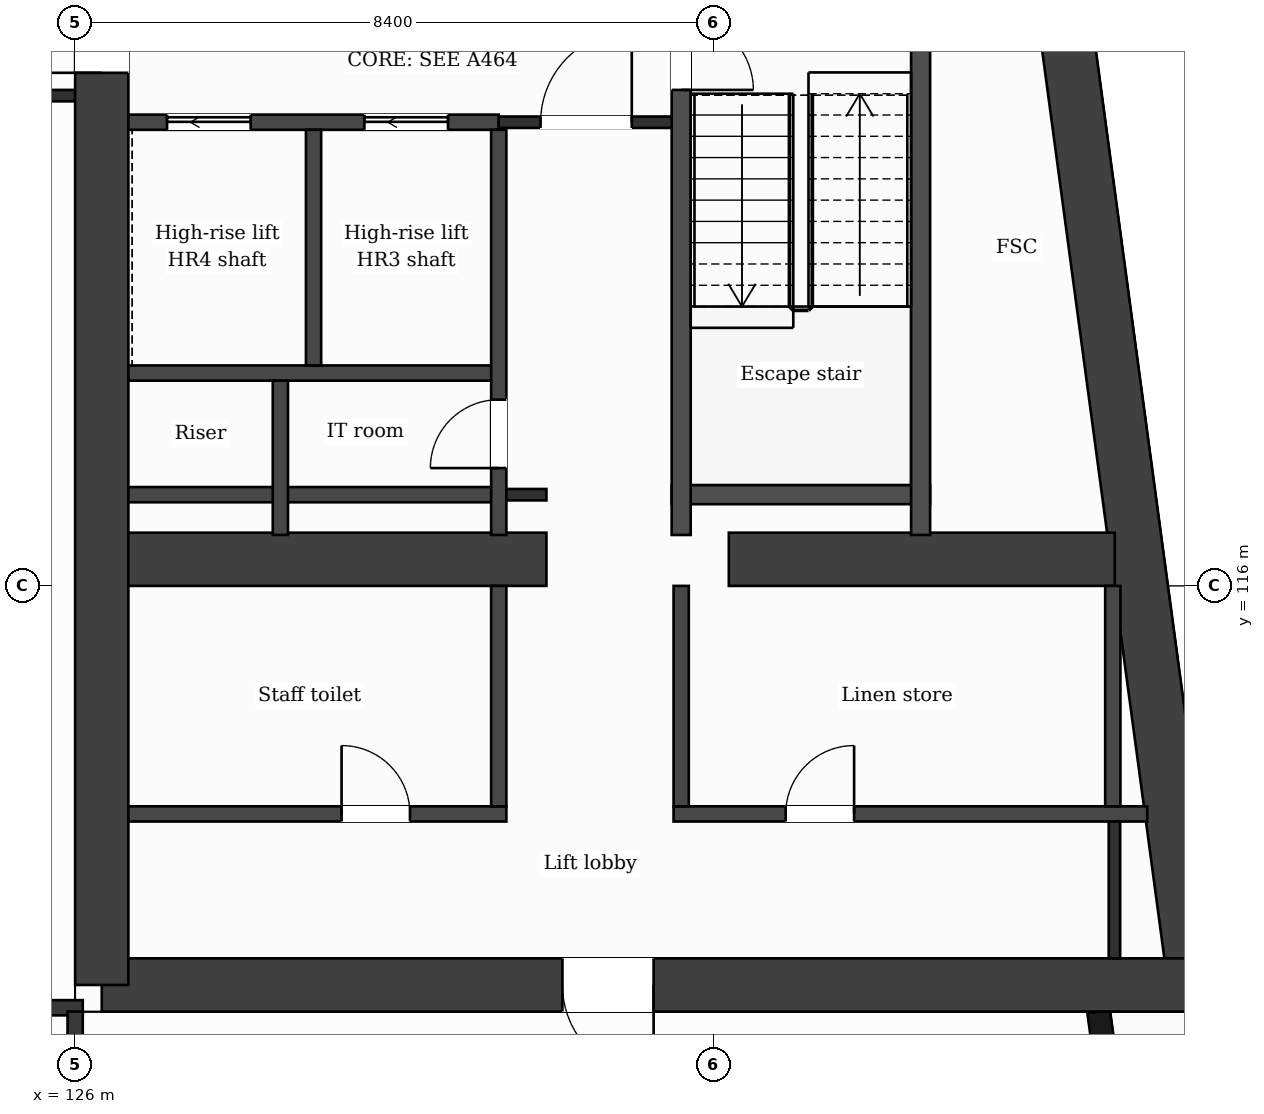
"""IFC4 building model, lengths in metres.
Left out: names, types, materials, properties, quantities, classifications, styles, units other than length and angle.
Written with IfcOpenShell. Run it as: python <this file> out.ifc"""

import sys

from ifc_helpers import new_model, si_unit, direction, frame, frame_2d, origin, place, context, subcontext, project, spatial, rectangle, extrude, element, fill, save


model = new_model("IFC4")
c1 = context("Model", 3, precision=1e-05, world=origin(), true_north=direction((0.0, 1.0)))
c2 = subcontext(c1, "Body", "Model", "MODEL_VIEW")
j1 = project(units=[si_unit("LENGTHUNIT", "METRE"), si_unit("PLANEANGLEUNIT", "RADIAN")], contexts=[c1])
p1 = place(None, origin())
s1 = spatial("IfcSite", under=j1, at=p1, CompositionType="ELEMENT")
p2 = place(p1, origin())
s2 = spatial("IfcBuilding", under=s1, at=p2, CompositionType="ELEMENT")
p3 = place(p2, frame((0.0, 0.0, 262.7)))
s3 = spatial("IfcBuildingStorey", under=s2, at=p3, CompositionType="ELEMENT", Elevation=262.7)
p4 = place(p3, frame((137.863, 132.05, 0.0), z_axis=(0.0, 0.0, 1.0), x_axis=(0.133406218907, -0.991061441464, 0.0)))
e1 = element("IfcWall", 1, at=p4, inside=s3, PredefinedType="SHEAR", context=c2, shape_type="SweptSolid", body=[
    extrude(rectangle(XDim=21.492, YDim=0.7, at=frame_2d((10.746, 0.0))), origin(), (0.0, 0.0, 1.0), 3.7),
])
p5 = place(p3, frame((140.73, 110.75, 0.0), z_axis=(0.0, 0.0, 1.0), x_axis=(-1.0, 0.0, 0.0)))
e2 = element("IfcWall", 2, at=p5, inside=s3, PredefinedType="SHEAR", context=c2, shape_type="SweptSolid", body=[
    extrude(rectangle(XDim=14.38, YDim=0.7, at=frame_2d((7.19, 0.0))), origin(), (0.0, 0.0, 1.0), 3.7),
])
p6 = place(p5, frame((7.12, 0.0, 0.0)))
e3 = element("IfcOpeningElement", 3, at=p6, cuts=e2, PredefinedType="OPENING", context=c2, shape_type="SweptSolid", body=[
    extrude(rectangle(XDim=1.2, YDim=2.1, at=frame_2d((0.6, 1.05))), frame((0.0, 0.36, 0.0), z_axis=(0.0, -1.0, 0.0), x_axis=(1.0, 0.0, 0.0)), (0.0, 0.0, 1.0), 0.72),
])
p7 = place(p3, frame((126.35, 110.75, 0.0), z_axis=(0.0, 0.0, 1.0), x_axis=(0.0, 1.0, 0.0)))
e4 = element("IfcWall", 4, at=p7, inside=s3, PredefinedType="SHEAR", context=c2, shape_type="SweptSolid", body=[
    extrude(rectangle(XDim=21.3, YDim=0.7, at=frame_2d((10.65, 0.0))), origin(), (0.0, 0.0, 1.0), 3.7),
])
p8 = place(p7, frame((12.0, 0.0, 0.0)))
e5 = element("IfcOpeningElement", 5, at=p8, cuts=e4, PredefinedType="OPENING", context=c2, shape_type="SweptSolid", body=[
    extrude(rectangle(XDim=1.4, YDim=2.1, at=frame_2d((0.7, 1.05))), frame((0.0, 0.36, 0.0), z_axis=(0.0, -1.0, 0.0), x_axis=(1.0, 0.0, 0.0)), (0.0, 0.0, 1.0), 0.72),
])
p9 = place(p3, frame((126.7, 116.35, 0.0), z_axis=(0.0, 0.0, 1.0), x_axis=(1.0, 0.0, 0.0)))
e6 = element("IfcWall", 6, at=p9, inside=s3, PredefinedType="SHEAR", context=c2, shape_type="SweptSolid", body=[
    extrude(rectangle(XDim=5.5, YDim=0.7, at=frame_2d((2.75, 0.0))), origin(), (0.0, 0.0, 1.0), 3.7),
])
p10 = place(p3, frame((134.6, 116.35, 0.0), z_axis=(0.0, 0.0, 1.0), x_axis=(1.0, 0.0, 0.0)))
e7 = element("IfcWall", 7, at=p10, inside=s3, PredefinedType="SHEAR", context=c2, shape_type="SweptSolid", body=[
    extrude(rectangle(XDim=5.077, YDim=0.7, at=frame_2d((2.539, 0.0))), origin(), (0.0, 0.0, 1.0), 3.7),
])
p11 = place(p3, frame((139.701, 108.65, 0.0), z_axis=(0.0, 0.0, 1.0), x_axis=(-0.133422458344, 0.991059255347, 0.0)))
e8 = element("IfcWall", 8, at=p11, inside=s3, PredefinedType="SOLIDWALL", context=c2, shape_type="SweptSolid", body=[
    extrude(rectangle(XDim=1.766, YDim=0.3, at=frame_2d((0.883, 0.0))), origin(), (0.0, 0.0, 1.0), 3.38),
])
p12 = place(p3, frame((100.7, 110.45, 0.0), z_axis=(0.0, 0.0, 1.0), x_axis=(1.0, 0.0, 0.0)))
e9 = element("IfcWall", 9, at=p12, inside=s3, PredefinedType="PARTITIONING", context=c2, shape_type="SweptSolid", body=[
    extrude(rectangle(XDim=25.4, YDim=0.2, at=frame_2d((12.7, 0.0))), origin(), (0.0, 0.0, 1.0), 3.38),
])
p13 = place(p3, frame((126.7, 113.0, 0.0), z_axis=(0.0, 0.0, 1.0), x_axis=(1.0, 0.0, 0.0)))
e10 = element("IfcWall", 10, at=p13, inside=s3, PredefinedType="PARTITIONING", context=c2, shape_type="SweptSolid", body=[
    extrude(rectangle(XDim=4.973, YDim=0.2, at=frame_2d((2.487, 0.0))), origin(), (0.0, 0.0, 1.0), 3.38),
])
p14 = place(p13, frame((2.805, 0.0, 0.0)))
e11 = element("IfcOpeningElement", 11, at=p14, cuts=e10, PredefinedType="OPENING", context=c2, shape_type="SweptSolid", body=[
    extrude(rectangle(XDim=0.9, YDim=2.1, at=frame_2d((0.45, 1.05))), frame((0.0, 0.11, 0.0), z_axis=(0.0, -1.0, 0.0), x_axis=(1.0, 0.0, 0.0)), (0.0, 0.0, 1.0), 0.22),
])
p15 = place(p3, frame((133.873, 113.0, 0.0), z_axis=(0.0, 0.0, 1.0), x_axis=(1.0, 0.0, 0.0)))
e12 = element("IfcWall", 12, at=p15, inside=s3, PredefinedType="PARTITIONING", context=c2, shape_type="SweptSolid", body=[
    extrude(rectangle(XDim=6.231, YDim=0.2, at=frame_2d((3.116, 0.0))), origin(), (0.0, 0.0, 1.0), 3.38),
])
p16 = place(p15, frame((1.475, 0.0, 0.0)))
e13 = element("IfcOpeningElement", 13, at=p16, cuts=e12, PredefinedType="OPENING", context=c2, shape_type="SweptSolid", body=[
    extrude(rectangle(XDim=0.9, YDim=2.1, at=frame_2d((0.45, 1.05))), frame((0.0, 0.11, 0.0), z_axis=(0.0, -1.0, 0.0), x_axis=(1.0, 0.0, 0.0)), (0.0, 0.0, 1.0), 0.22),
])
p17 = place(p3, frame((126.7, 117.2, 0.0), z_axis=(0.0, 0.0, 1.0), x_axis=(1.0, 0.0, 0.0)))
e14 = element("IfcWall", 14, at=p17, inside=s3, PredefinedType="PARTITIONING", context=c2, shape_type="SweptSolid", body=[
    extrude(rectangle(XDim=4.873, YDim=0.2, at=frame_2d((2.437, 0.0))), origin(), (0.0, 0.0, 1.0), 3.38),
])
p18 = place(p3, frame((131.573, 117.2, 0.0), z_axis=(0.0, 0.0, 1.0), x_axis=(1.0, 0.0, 0.0)))
e15 = element("IfcWall", 15, at=p18, inside=s3, PredefinedType="PARTITIONING", context=c2, shape_type="SweptSolid", body=[
    extrude(rectangle(XDim=0.627, YDim=0.15, at=frame_2d((0.313, 0.0))), origin(), (0.0, 0.0, 1.0), 3.38),
])
p19 = place(p3, frame((133.848, 117.2, 0.0), z_axis=(0.0, 0.0, 1.0), x_axis=(1.0, 0.0, 0.0)))
e16 = element("IfcWall", 16, at=p19, inside=s3, PredefinedType="PARTITIONING", context=c2, shape_type="SweptSolid", body=[
    extrude(rectangle(XDim=3.4, YDim=0.25, at=frame_2d((1.7, 0.0))), origin(), (0.0, 0.0, 1.0), 3.38),
])
p20 = place(p3, frame((126.7, 118.8, 0.0), z_axis=(0.0, 0.0, 1.0), x_axis=(1.0, 0.0, 0.0)))
e17 = element("IfcWall", 17, at=p20, inside=s3, PredefinedType="PARTITIONING", context=c2, shape_type="SweptSolid", body=[
    extrude(rectangle(XDim=4.873, YDim=0.2, at=frame_2d((2.437, 0.0))), origin(), (0.0, 0.0, 1.0), 3.38),
])
p21 = place(p3, frame((126.7, 122.1, 0.0), z_axis=(0.0, 0.0, 1.0), x_axis=(1.0, 0.0, 0.0)))
e18 = element("IfcWall", 18, at=p21, inside=s3, PredefinedType="PARTITIONING", context=c2, shape_type="SweptSolid", body=[
    extrude(rectangle(XDim=4.873, YDim=0.2, at=frame_2d((2.437, 0.0))), origin(), (0.0, 0.0, 1.0), 3.38),
])
p22 = place(p21, frame((3.105, 0.0, 0.0)))
e19 = element("IfcOpeningElement", 19, at=p22, cuts=e18, PredefinedType="OPENING", context=c2, shape_type="SweptSolid", body=[
    extrude(rectangle(XDim=1.1, YDim=2.1, at=frame_2d((0.55, 1.05))), frame((0.0, 0.11, 0.0), z_axis=(0.0, -1.0, 0.0), x_axis=(1.0, 0.0, 0.0)), (0.0, 0.0, 1.0), 0.22),
])
p23 = place(p21, frame((0.509, 0.0, 0.0)))
e20 = element("IfcOpeningElement", 20, at=p23, cuts=e18, PredefinedType="OPENING", context=c2, shape_type="SweptSolid", body=[
    extrude(rectangle(XDim=1.1, YDim=2.1, at=frame_2d((0.55, 1.05))), frame((0.0, 0.11, 0.0), z_axis=(0.0, -1.0, 0.0), x_axis=(1.0, 0.0, 0.0)), (0.0, 0.0, 1.0), 0.22),
])
p24 = place(p3, frame((131.573, 122.1, 0.0), z_axis=(0.0, 0.0, 1.0), x_axis=(1.0, 0.0, 0.0)))
e21 = element("IfcWall", 21, at=p24, inside=s3, PredefinedType="PARTITIONING", context=c2, shape_type="SweptSolid", body=[
    extrude(rectangle(XDim=2.4, YDim=0.15, at=frame_2d((1.2, 0.0))), origin(), (0.0, 0.0, 1.0), 3.38),
])
p25 = place(p24, frame((0.55, 0.0, 0.0)))
e22 = element("IfcOpeningElement", 22, at=p25, cuts=e21, PredefinedType="OPENING", context=c2, shape_type="SweptSolid", body=[
    extrude(rectangle(XDim=1.2, YDim=2.1, at=frame_2d((0.6, 1.05))), frame((0.0, 0.085, 0.0), z_axis=(0.0, -1.0, 0.0), x_axis=(1.0, 0.0, 0.0)), (0.0, 0.0, 1.0), 0.17),
])
p26 = place(p3, frame((100.8, 122.45, 0.0), z_axis=(0.0, 0.0, 1.0), x_axis=(1.0, 0.0, 0.0)))
e23 = element("IfcWall", 23, at=p26, inside=s3, PredefinedType="PARTITIONING", context=c2, shape_type="SweptSolid", body=[
    extrude(rectangle(XDim=25.2, YDim=0.15, at=frame_2d((12.6, 0.0))), origin(), (0.0, 0.0, 1.0), 3.38),
])
p27 = place(p26, frame((5.55, 0.0, 0.0)))
e24 = element("IfcOpeningElement", 24, at=p27, cuts=e23, PredefinedType="OPENING", context=c2, shape_type="SweptSolid", body=[
    extrude(rectangle(XDim=1.0, YDim=2.1, at=frame_2d((0.5, 1.05))), frame((0.0, 0.085, 0.0), z_axis=(0.0, -1.0, 0.0), x_axis=(1.0, 0.0, 0.0)), (0.0, 0.0, 1.0), 0.17),
])
p28 = place(p26, frame((8.65, 0.0, 0.0)))
e25 = element("IfcOpeningElement", 25, at=p28, cuts=e23, PredefinedType="OPENING", context=c2, shape_type="SweptSolid", body=[
    extrude(rectangle(XDim=1.0, YDim=2.1, at=frame_2d((0.5, 1.05))), frame((0.0, 0.085, 0.0), z_axis=(0.0, -1.0, 0.0), x_axis=(1.0, 0.0, 0.0)), (0.0, 0.0, 1.0), 0.17),
])
p29 = place(p26, frame((19.83, 0.0, 0.0)))
e26 = element("IfcOpeningElement", 26, at=p29, cuts=e23, PredefinedType="OPENING", context=c2, shape_type="SweptSolid", body=[
    extrude(rectangle(XDim=1.0, YDim=2.1, at=frame_2d((0.5, 1.05))), frame((0.0, 0.085, 0.0), z_axis=(0.0, -1.0, 0.0), x_axis=(1.0, 0.0, 0.0)), (0.0, 0.0, 1.0), 0.17),
])
p30 = place(p3, frame((126.0, 108.79, 0.0), z_axis=(0.0, 0.0, 1.0), x_axis=(0.0, 1.0, 0.0)))
e27 = element("IfcWall", 27, at=p30, inside=s3, PredefinedType="PARTITIONING", context=c2, shape_type="SweptSolid", body=[
    extrude(rectangle(XDim=1.61, YDim=0.2, at=frame_2d((0.805, 0.0))), origin(), (0.0, 0.0, 1.0), 3.38),
])
p31 = place(p3, frame((128.7, 116.67, 0.0), z_axis=(0.0, 0.0, 1.0), x_axis=(0.0, 1.0, 0.0)))
e28 = element("IfcWall", 28, at=p31, inside=s3, PredefinedType="PARTITIONING", context=c2, shape_type="SweptSolid", body=[
    extrude(rectangle(XDim=2.03, YDim=0.2, at=frame_2d((1.015, 0.0))), origin(), (0.0, 0.0, 1.0), 3.38),
])
p32 = place(p3, frame((129.136, 118.9, 0.0), z_axis=(0.0, 0.0, 1.0), x_axis=(0.0, 1.0, 0.0)))
e29 = element("IfcWall", 29, at=p32, inside=s3, PredefinedType="PARTITIONING", context=c2, shape_type="SweptSolid", body=[
    extrude(rectangle(XDim=3.1, YDim=0.2, at=frame_2d((1.55, 0.0))), origin(), (0.0, 0.0, 1.0), 3.38),
])
p33 = place(p3, frame((131.573, 113.1, 0.0), z_axis=(0.0, 0.0, 1.0), x_axis=(0.0, 1.0, 0.0)))
e30 = element("IfcWall", 30, at=p33, inside=s3, PredefinedType="PARTITIONING", context=c2, shape_type="SweptSolid", body=[
    extrude(rectangle(XDim=2.9, YDim=0.2, at=frame_2d((1.45, 0.0))), origin(), (0.0, 0.0, 1.0), 3.38),
])
p34 = place(p3, frame((131.573, 116.67, 0.0), z_axis=(0.0, 0.0, 1.0), x_axis=(0.0, 1.0, 0.0)))
e31 = element("IfcWall", 31, at=p34, inside=s3, PredefinedType="PARTITIONING", context=c2, shape_type="SweptSolid", body=[
    extrude(rectangle(XDim=5.33, YDim=0.2, at=frame_2d((2.665, 0.0))), origin(), (0.0, 0.0, 1.0), 3.38),
])
p35 = place(p34, frame((0.88, 0.0, 0.0)))
e32 = element("IfcOpeningElement", 32, at=p35, cuts=e31, PredefinedType="OPENING", context=c2, shape_type="SweptSolid", body=[
    extrude(rectangle(XDim=0.9, YDim=2.1, at=frame_2d((0.45, 1.05))), frame((0.0, 0.11, 0.0), z_axis=(0.0, -1.0, 0.0), x_axis=(1.0, 0.0, 0.0)), (0.0, 0.0, 1.0), 0.22),
])
p36 = place(p3, frame((133.973, 113.1, 0.0), z_axis=(0.0, 0.0, 1.0), x_axis=(0.0, 1.0, 0.0)))
e33 = element("IfcWall", 33, at=p36, inside=s3, PredefinedType="PARTITIONING", context=c2, shape_type="SweptSolid", body=[
    extrude(rectangle(XDim=2.9, YDim=0.2, at=frame_2d((1.45, 0.0))), origin(), (0.0, 0.0, 1.0), 3.38),
])
p37 = place(p3, frame((133.973, 116.67, 0.0), z_axis=(0.0, 0.0, 1.0), x_axis=(0.0, 1.0, 0.0)))
e34 = element("IfcWall", 34, at=p37, inside=s3, PredefinedType="PARTITIONING", context=c2, shape_type="SweptSolid", body=[
    extrude(rectangle(XDim=7.155, YDim=0.25, at=frame_2d((3.578, 0.0))), origin(), (0.0, 0.0, 1.0), 3.38),
])
p38 = place(p37, frame((5.855, 0.0, 0.0)))
e35 = element("IfcOpeningElement", 35, at=p38, cuts=e34, PredefinedType="OPENING", context=c2, shape_type="SweptSolid", body=[
    extrude(rectangle(XDim=0.95, YDim=2.1, at=frame_2d((0.475, 1.05))), frame((0.0, 0.135, 0.0), z_axis=(0.0, -1.0, 0.0), x_axis=(1.0, 0.0, 0.0)), (0.0, 0.0, 1.0), 0.27),
])
p39 = place(p3, frame((137.123, 116.67, 0.0), z_axis=(0.0, 0.0, 1.0), x_axis=(0.0, 1.0, 0.0)))
e36 = element("IfcWall", 36, at=p39, inside=s3, PredefinedType="PARTITIONING", context=c2, shape_type="SweptSolid", body=[
    extrude(rectangle(XDim=7.155, YDim=0.25, at=frame_2d((3.578, 0.0))), origin(), (0.0, 0.0, 1.0), 3.38),
])
p40 = place(p3, frame((139.652, 113.1, 0.0), z_axis=(0.0, 0.0, 1.0), x_axis=(0.0, 1.0, 0.0)))
e37 = element("IfcWall", 37, at=p40, inside=s3, PredefinedType="PARTITIONING", context=c2, shape_type="SweptSolid", body=[
    extrude(rectangle(XDim=2.9, YDim=0.2, at=frame_2d((1.45, 0.0))), origin(), (0.0, 0.0, 1.0), 3.38),
])
p41 = place(p3, frame((139.673, 111.1, 0.0), z_axis=(0.0, 0.0, 1.0), x_axis=(0.0, 1.0, 0.0)))
e38 = element("IfcWall", 38, at=p41, inside=s3, PredefinedType="PARTITIONING", context=c2, shape_type="SweptSolid", body=[
    extrude(rectangle(XDim=1.8, YDim=0.15, at=frame_2d((0.9, 0.0))), origin(), (0.0, 0.0, 1.0), 3.38),
])
p42 = place(p25, origin())
e39 = element("IfcDoor", 39, at=p42, inside=s3, OperationType="SINGLE_SWING_RIGHT", PredefinedType="DOOR", context=c2, shape_type="SweptSolid", body=[
    extrude(rectangle(XDim=1.2, YDim=2.1, at=frame_2d((0.6, 1.05))), frame((0.0, 0.025, 0.0), z_axis=(0.0, -1.0, 0.0), x_axis=(1.0, 0.0, 0.0)), (0.0, 0.0, 1.0), 0.05),
])
fill(e22, e39)
p43 = place(p22, origin())
e40 = element("IfcDoor", 40, at=p43, inside=s3, OperationType="SLIDING_TO_LEFT", PredefinedType="DOOR", context=c2, shape_type="SweptSolid", body=[
    extrude(rectangle(XDim=1.1, YDim=2.1, at=frame_2d((0.55, 1.05))), frame((0.0, 0.025, 0.0), z_axis=(0.0, -1.0, 0.0), x_axis=(1.0, 0.0, 0.0)), (0.0, 0.0, 1.0), 0.05),
])
fill(e19, e40)
p44 = place(p23, origin())
e41 = element("IfcDoor", 41, at=p44, inside=s3, OperationType="SLIDING_TO_LEFT", PredefinedType="DOOR", context=c2, shape_type="SweptSolid", body=[
    extrude(rectangle(XDim=1.1, YDim=2.1, at=frame_2d((0.55, 1.05))), frame((0.0, 0.025, 0.0), z_axis=(0.0, -1.0, 0.0), x_axis=(1.0, 0.0, 0.0)), (0.0, 0.0, 1.0), 0.05),
])
fill(e20, e41)
p45 = place(p38, origin())
e42 = element("IfcDoor", 42, at=p45, inside=s3, OperationType="SINGLE_SWING_LEFT", PredefinedType="DOOR", context=c2, shape_type="SweptSolid", body=[
    extrude(rectangle(XDim=0.95, YDim=2.1, at=frame_2d((0.475, 1.05))), frame((0.0, 0.025, 0.0), z_axis=(0.0, -1.0, 0.0), x_axis=(1.0, 0.0, 0.0)), (0.0, 0.0, 1.0), 0.05),
])
fill(e35, e42)
p46 = place(p35, origin())
e43 = element("IfcDoor", 43, at=p46, inside=s3, OperationType="SINGLE_SWING_LEFT", PredefinedType="DOOR", context=c2, shape_type="SweptSolid", body=[
    extrude(rectangle(XDim=0.9, YDim=2.1, at=frame_2d((0.45, 1.05))), frame((0.0, 0.025, 0.0), z_axis=(0.0, -1.0, 0.0), x_axis=(1.0, 0.0, 0.0)), (0.0, 0.0, 1.0), 0.05),
])
fill(e32, e43)
p47 = place(p16, origin())
e44 = element("IfcDoor", 44, at=p47, inside=s3, OperationType="SINGLE_SWING_RIGHT", PredefinedType="DOOR", context=c2, shape_type="SweptSolid", body=[
    extrude(rectangle(XDim=0.9, YDim=2.1, at=frame_2d((0.45, 1.05))), frame((0.0, 0.025, 0.0), z_axis=(0.0, -1.0, 0.0), x_axis=(1.0, 0.0, 0.0)), (0.0, 0.0, 1.0), 0.05),
])
fill(e13, e44)
p48 = place(p14, origin())
e45 = element("IfcDoor", 45, at=p48, inside=s3, OperationType="SINGLE_SWING_LEFT", PredefinedType="DOOR", context=c2, shape_type="SweptSolid", body=[
    extrude(rectangle(XDim=0.9, YDim=2.1, at=frame_2d((0.45, 1.05))), frame((0.0, 0.025, 0.0), z_axis=(0.0, -1.0, 0.0), x_axis=(1.0, 0.0, 0.0)), (0.0, 0.0, 1.0), 0.05),
])
fill(e11, e45)
p49 = place(p6, origin())
e46 = element("IfcDoor", 46, at=p49, inside=s3, OperationType="SINGLE_SWING_LEFT", PredefinedType="DOOR", context=c2, shape_type="SweptSolid", body=[
    extrude(rectangle(XDim=1.2, YDim=2.1, at=frame_2d((0.6, 1.05))), frame((0.0, 0.025, 0.0), z_axis=(0.0, -1.0, 0.0), x_axis=(1.0, 0.0, 0.0)), (0.0, 0.0, 1.0), 0.05),
])
fill(e3, e46)
p50 = place(p8, origin())
e47 = element("IfcDoor", 47, at=p50, inside=s3, OperationType="SINGLE_SWING_LEFT", PredefinedType="DOOR", context=c2, shape_type="SweptSolid", body=[
    extrude(rectangle(XDim=1.4, YDim=2.1, at=frame_2d((0.7, 1.05))), frame((0.0, 0.025, 0.0), z_axis=(0.0, -1.0, 0.0), x_axis=(1.0, 0.0, 0.0)), (0.0, 0.0, 1.0), 0.05),
])
fill(e5, e47)
save(model, sys.argv[1])
